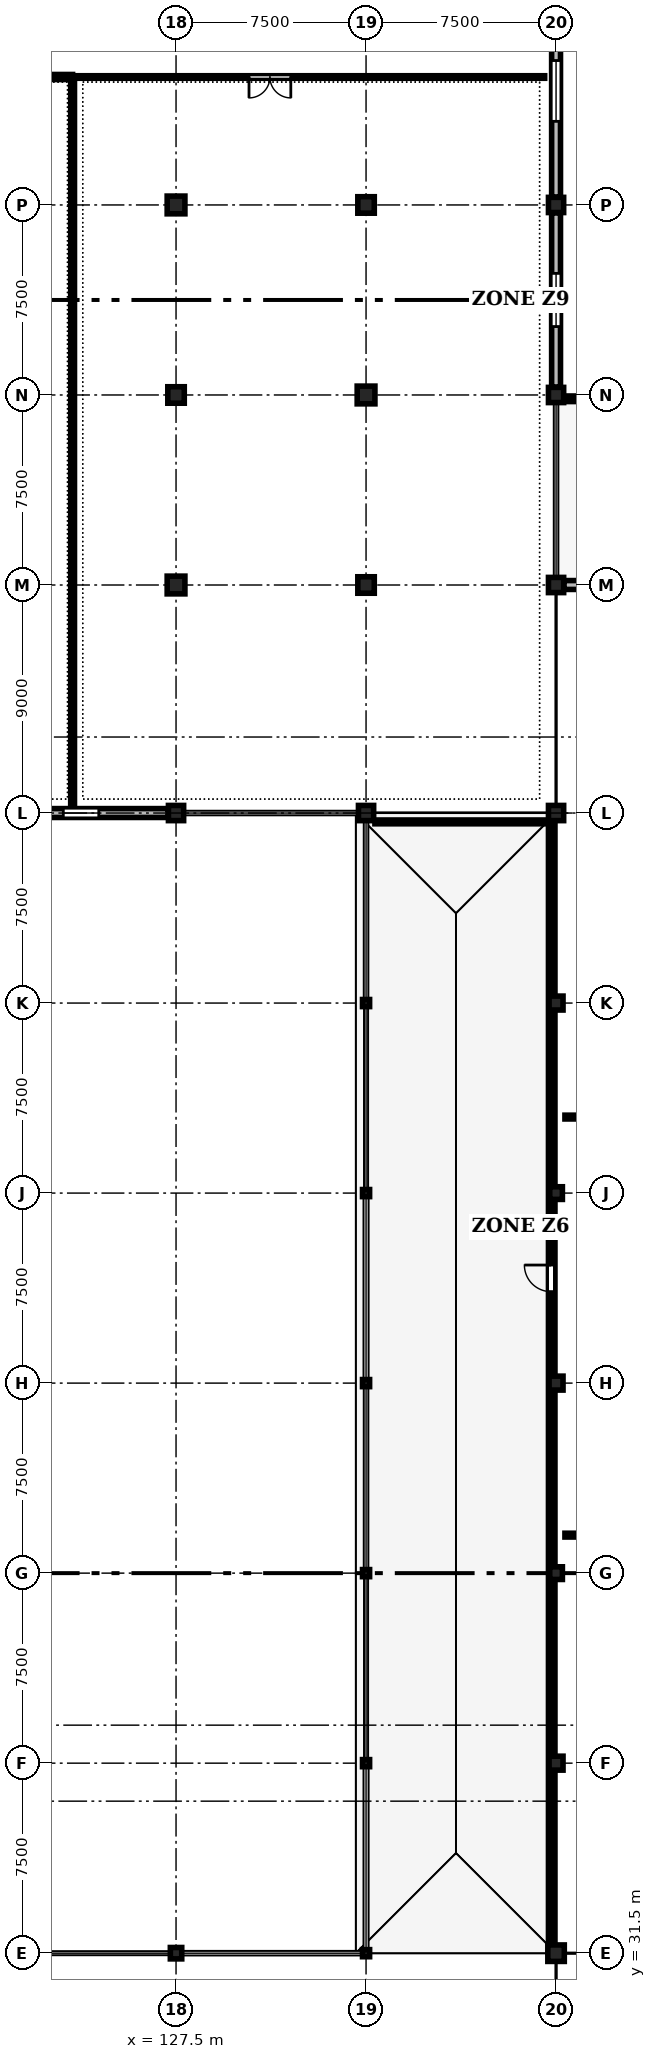
"""IFC4 building model, lengths in metres.
Left out: names, types, materials, properties, quantities, classifications, styles, units other than length and angle.
Written with IfcOpenShell. Run it as: python <this file> out.ifc"""

import sys

from ifc_helpers import new_model, si_unit, direction, frame, frame_2d, origin, origin_2d, place, context, subcontext, project, spatial, rectangle, circle, extrude, element, fill, save


model = new_model("IFC4")
c1 = context("Model", 3, precision=1e-05, world=origin(), true_north=direction((0.0, 1.0)))
c2 = subcontext(c1, "Body", "Model", "MODEL_VIEW")
j1 = project(units=[si_unit("LENGTHUNIT", "METRE"), si_unit("PLANEANGLEUNIT", "RADIAN")], contexts=[c1])
p1 = place(None, origin())
s1 = spatial("IfcSite", under=j1, at=p1, CompositionType="ELEMENT")
p2 = place(p1, origin())
s2 = spatial("IfcBuilding", under=s1, at=p2, CompositionType="ELEMENT")
p3 = place(p2, frame((0.0, 0.0, 4.8)))
s3 = spatial("IfcBuildingStorey", under=s2, at=p3, CompositionType="ELEMENT", Elevation=4.8)
p4 = place(p3, frame((127.5, 31.5, 0.0), z_axis=(0.0, 0.0, 1.0), x_axis=(1.0, 0.0, 0.0)))
e1 = element("IfcColumn", 1, at=p4, inside=s3, PredefinedType="COLUMN", context=c2, shape_type="SweptSolid", body=[
    extrude(rectangle(XDim=0.45, YDim=0.45, at=origin_2d()), origin(), (0.0, 0.0, 1.0), 4.5),
])
p5 = place(p3, frame((127.5, 76.5, 0.0), z_axis=(0.0, 0.0, 1.0), x_axis=(1.0, 0.0, 0.0)))
e2 = element("IfcColumn", 2, at=p5, inside=s3, PredefinedType="COLUMN", context=c2, shape_type="SweptSolid", body=[
    extrude(circle(Radius=0.3, at=origin_2d()), origin(), (0.0, 0.0, 1.0), 4.5),
])
p6 = place(p3, frame((127.5, 85.5, 0.0), z_axis=(0.0, 0.0, 1.0), x_axis=(1.0, 0.0, 0.0)))
e3 = element("IfcColumn", 3, at=p6, inside=s3, PredefinedType="COLUMN", context=c2, shape_type="SweptSolid", body=[
    extrude(rectangle(XDim=0.7, YDim=0.7, at=origin_2d()), origin(), (0.0, 0.0, 1.0), 4.5),
])
p7 = place(p3, frame((127.5, 93.0, 0.0), z_axis=(0.0, 0.0, 1.0), x_axis=(1.0, 0.0, 0.0)))
e4 = element("IfcColumn", 4, at=p7, inside=s3, PredefinedType="COLUMN", context=c2, shape_type="SweptSolid", body=[
    extrude(rectangle(XDim=0.65, YDim=0.65, at=origin_2d()), origin(), (0.0, 0.0, 1.0), 4.5),
])
p8 = place(p3, frame((127.5, 100.5, 0.0), z_axis=(0.0, 0.0, 1.0), x_axis=(1.0, 0.0, 0.0)))
e5 = element("IfcColumn", 5, at=p8, inside=s3, PredefinedType="COLUMN", context=c2, shape_type="SweptSolid", body=[
    extrude(rectangle(XDim=0.7, YDim=0.7, at=origin_2d()), origin(), (0.0, 0.0, 1.0), 4.5),
])
for number, where, z_axis, x_axis in (
    (6, (135.0, 31.5, 0.0), (0.0, 0.0, 1.0), (1.0, 0.0, 0.0)),
    (7, (135.0, 39.0, 0.0), (0.0, 0.0, 1.0), (1.0, 0.0, 0.0)),
    (8, (135.0, 46.5, 0.0), (0.0, 0.0, 1.0), (1.0, 0.0, 0.0)),
    (9, (135.0, 54.0, 0.0), (0.0, 0.0, 1.0), (1.0, 0.0, 0.0)),
    (10, (135.0, 61.5, 0.0), (0.0, 0.0, 1.0), (1.0, 0.0, 0.0)),
    (11, (135.0, 69.0, 0.0), (0.0, 0.0, 1.0), (1.0, 0.0, 0.0)),
):
    element("IfcColumn", number, at=place(p3, frame(where, z_axis=z_axis, x_axis=x_axis)), inside=s3, PredefinedType="COLUMN", context=c2, shape_type="SweptSolid", body=[
        extrude(rectangle(XDim=0.28, YDim=0.28, at=origin_2d()), origin(), (0.0, 0.0, 1.0), 4.5),
    ])
p9 = place(p3, frame((135.0, 76.5, 0.0), z_axis=(0.0, 0.0, 1.0), x_axis=(1.0, 0.0, 0.0)))
e12 = element("IfcColumn", 12, at=p9, inside=s3, PredefinedType="COLUMN", context=c2, shape_type="SweptSolid", body=[
    extrude(rectangle(XDim=0.6, YDim=0.6, at=origin_2d()), origin(), (0.0, 0.0, 1.0), 4.5),
])
p10 = place(p3, frame((135.0, 85.5, 0.0), z_axis=(0.0, 0.0, 1.0), x_axis=(1.0, 0.0, 0.0)))
e13 = element("IfcColumn", 13, at=p10, inside=s3, PredefinedType="COLUMN", context=c2, shape_type="SweptSolid", body=[
    extrude(rectangle(XDim=0.65, YDim=0.65, at=origin_2d()), origin(), (0.0, 0.0, 1.0), 4.5),
])
p11 = place(p3, frame((135.0, 93.0, 0.0), z_axis=(0.0, 0.0, 1.0), x_axis=(1.0, 0.0, 0.0)))
e14 = element("IfcColumn", 14, at=p11, inside=s3, PredefinedType="COLUMN", context=c2, shape_type="SweptSolid", body=[
    extrude(rectangle(XDim=0.7, YDim=0.7, at=origin_2d()), origin(), (0.0, 0.0, 1.0), 4.5),
])
for number, where, z_axis, x_axis in (
    (15, (135.0, 100.5, 0.0), (0.0, 0.0, 1.0), (1.0, 0.0, 0.0)),
    (16, (142.5, 31.5, 0.0), (0.0, 0.0, 1.0), (1.0, 0.0, 0.0)),
):
    element("IfcColumn", number, at=place(p3, frame(where, z_axis=z_axis, x_axis=x_axis)), inside=s3, PredefinedType="COLUMN", context=c2, shape_type="SweptSolid", body=[
        extrude(rectangle(XDim=0.65, YDim=0.65, at=origin_2d()), origin(), (0.0, 0.0, 1.0), 4.5),
    ])
p12 = place(p3, frame((142.5, 39.0, 0.0), z_axis=(0.0, 0.0, 1.0), x_axis=(1.0, 0.0, 0.0)))
e17 = element("IfcColumn", 17, at=p12, inside=s3, PredefinedType="COLUMN", context=c2, shape_type="SweptSolid", body=[
    extrude(rectangle(XDim=0.55, YDim=0.55, at=origin_2d()), origin(), (0.0, 0.0, 1.0), 4.5),
])
p13 = place(p3, frame((142.5, 46.5, 0.0), z_axis=(0.0, 0.0, 1.0), x_axis=(1.0, 0.0, 0.0)))
e18 = element("IfcColumn", 18, at=p13, inside=s3, PredefinedType="COLUMN", context=c2, shape_type="SweptSolid", body=[
    extrude(rectangle(XDim=0.5, YDim=0.5, at=origin_2d()), origin(), (0.0, 0.0, 1.0), 4.5),
])
p14 = place(p3, frame((142.5, 54.0, 0.0), z_axis=(0.0, 0.0, 1.0), x_axis=(1.0, 0.0, 0.0)))
e19 = element("IfcColumn", 19, at=p14, inside=s3, PredefinedType="COLUMN", context=c2, shape_type="SweptSolid", body=[
    extrude(rectangle(XDim=0.55, YDim=0.55, at=origin_2d()), origin(), (0.0, 0.0, 1.0), 4.5),
])
p15 = place(p3, frame((142.5, 61.5, 0.0), z_axis=(0.0, 0.0, 1.0), x_axis=(1.0, 0.0, 0.0)))
e20 = element("IfcColumn", 20, at=p15, inside=s3, PredefinedType="COLUMN", context=c2, shape_type="SweptSolid", body=[
    extrude(rectangle(XDim=0.5, YDim=0.5, at=origin_2d()), origin(), (0.0, 0.0, 1.0), 4.5),
])
p16 = place(p3, frame((142.5, 69.0, 0.0), z_axis=(0.0, 0.0, 1.0), x_axis=(1.0, 0.0, 0.0)))
e21 = element("IfcColumn", 21, at=p16, inside=s3, PredefinedType="COLUMN", context=c2, shape_type="SweptSolid", body=[
    extrude(rectangle(XDim=0.55, YDim=0.55, at=origin_2d()), origin(), (0.0, 0.0, 1.0), 4.5),
])
p17 = place(p3, frame((142.5, 76.5, 0.0), z_axis=(0.0, 0.0, 1.0), x_axis=(1.0, 0.0, 0.0)))
e22 = element("IfcColumn", 22, at=p17, inside=s3, PredefinedType="COLUMN", context=c2, shape_type="SweptSolid", body=[
    extrude(rectangle(XDim=0.6, YDim=0.6, at=origin_2d()), origin(), (0.0, 0.0, 1.0), 4.5),
])
p18 = place(p3, frame((142.5, 85.5, 0.0), z_axis=(0.0, 0.0, 1.0), x_axis=(1.0, 0.0, 0.0)))
e23 = element("IfcColumn", 23, at=p18, inside=s3, PredefinedType="COLUMN", context=c2, shape_type="SweptSolid", body=[
    extrude(circle(Radius=0.3, at=origin_2d()), origin(), (0.0, 0.0, 1.0), 4.5),
])
for number, where, z_axis, x_axis in (
    (24, (142.5, 93.0, 0.0), (0.0, 0.0, 1.0), (1.0, 0.0, 0.0)),
    (25, (142.5, 100.5, 0.0), (0.0, 0.0, 1.0), (1.0, 0.0, 0.0)),
):
    element("IfcColumn", number, at=place(p3, frame(where, z_axis=z_axis, x_axis=x_axis)), inside=s3, PredefinedType="COLUMN", context=c2, shape_type="SweptSolid", body=[
        extrude(rectangle(XDim=0.6, YDim=0.6, at=origin_2d()), origin(), (0.0, 0.0, 1.0), 4.5),
    ])
p19 = place(p3, frame((127.19, 76.5, 0.0), z_axis=(0.0, 0.0, 1.0), x_axis=(-1.0, 0.0, 0.0)))
e26 = element("IfcWall", 26, at=p19, inside=s3, PredefinedType="STANDARD", context=c2, shape_type="SweptSolid", body=[
    extrude(rectangle(XDim=6.88, YDim=0.35, at=frame_2d((3.44, 0.0))), origin(), (0.0, 0.0, 1.0), 3.63),
])
p20 = place(p19, frame((2.74, 0.0, 0.9)))
e27 = element("IfcOpeningElement", 27, at=p20, cuts=e26, PredefinedType="OPENING", context=c2, shape_type="SweptSolid", body=[
    extrude(rectangle(XDim=1.4, YDim=1.8, at=frame_2d((0.7, 0.9))), frame((0.0, 0.185, 0.0), z_axis=(0.0, -1.0, 0.0), x_axis=(1.0, 0.0, 0.0)), (0.0, 0.0, 1.0), 0.37),
])
p21 = place(p3, frame((142.5, 100.19, 0.0), z_axis=(0.0, 0.0, 1.0), x_axis=(0.0, -1.0, 0.0)))
e28 = element("IfcWall", 28, at=p21, inside=s3, PredefinedType="STANDARD", context=c2, shape_type="SweptSolid", body=[
    extrude(rectangle(XDim=6.88, YDim=0.35, at=frame_2d((3.44, 0.0))), origin(), (0.0, 0.0, 1.0), 3.63),
])
p22 = place(p21, frame((2.39, 0.0, 0.9)))
e29 = element("IfcOpeningElement", 29, at=p22, cuts=e28, PredefinedType="OPENING", context=c2, shape_type="SweptSolid", body=[
    extrude(rectangle(XDim=2.1, YDim=2.4, at=frame_2d((1.05, 1.2))), frame((0.0, 0.185, 0.0), z_axis=(0.0, -1.0, 0.0), x_axis=(1.0, 0.0, 0.0)), (0.0, 0.0, 1.0), 0.37),
])
p23 = place(p3, frame((142.5, 109.19, 0.0), z_axis=(0.0, 0.0, 1.0), x_axis=(0.0, -1.0, 0.0)))
e30 = element("IfcWall", 30, at=p23, inside=s3, PredefinedType="STANDARD", context=c2, shape_type="SweptSolid", body=[
    extrude(rectangle(XDim=8.38, YDim=0.35, at=frame_2d((4.19, 0.0))), origin(), (0.0, 0.0, 1.0), 3.63),
])
p24 = place(p23, frame((2.99, 0.0, 0.9)))
e31 = element("IfcOpeningElement", 31, at=p24, cuts=e30, PredefinedType="OPENING", context=c2, shape_type="SweptSolid", body=[
    extrude(rectangle(XDim=2.4, YDim=2.45, at=frame_2d((1.2, 1.225))), frame((0.0, 0.185, 0.0), z_axis=(0.0, -1.0, 0.0), x_axis=(1.0, 0.0, 0.0)), (0.0, 0.0, 1.0), 0.37),
])
p25 = place(p3, frame((142.81, 85.5, 0.0), z_axis=(0.0, 0.0, 1.0), x_axis=(1.0, 0.0, 0.0)))
e32 = element("IfcWall", 32, at=p25, inside=s3, PredefinedType="STANDARD", context=c2, shape_type="SweptSolid", body=[
    extrude(rectangle(XDim=6.93, YDim=0.35, at=frame_2d((3.465, 0.0))), origin(), (0.0, 0.0, 1.0), 3.63),
])
p26 = place(p25, frame((2.715, 0.0, 0.9)))
e33 = element("IfcOpeningElement", 33, at=p26, cuts=e32, PredefinedType="OPENING", context=c2, shape_type="SweptSolid", body=[
    extrude(rectangle(XDim=1.5, YDim=2.4, at=frame_2d((0.75, 1.2))), frame((0.0, 0.185, 0.0), z_axis=(0.0, -1.0, 0.0), x_axis=(1.0, 0.0, 0.0)), (0.0, 0.0, 1.0), 0.37),
])
p27 = place(p3, frame((142.65, 92.85, 0.08), z_axis=(0.0, 0.0, 1.0), x_axis=(1.0, 0.0, 0.0)))
e34 = element("IfcWall", 34, at=p27, inside=s3, PredefinedType="PARAPET", context=c2, shape_type="SweptSolid", body=[
    extrude(rectangle(XDim=29.7, YDim=0.22, at=frame_2d((14.85, 0.0))), origin(), (0.0, 0.0, 1.0), 0.28),
])
p28 = place(p3, frame((142.3, 31.5, 0.0), z_axis=(0.0, 0.0, 1.0), x_axis=(0.0, 1.0, 0.0)))
e35 = element("IfcWall", 35, at=p28, inside=s3, PredefinedType="STANDARD", context=c2, shape_type="SweptSolid", body=[
    extrude(rectangle(XDim=44.65, YDim=0.2, at=frame_2d((22.325, 0.0))), origin(), (0.0, 0.0, 1.0), 3.615),
])
p29 = place(p28, frame((26.11, 0.0, 0.0)))
e36 = element("IfcOpeningElement", 36, at=p29, cuts=e35, PredefinedType="OPENING", context=c2, shape_type="SweptSolid", body=[
    extrude(rectangle(XDim=1.05, YDim=2.2, at=frame_2d((0.525, 1.1))), frame((0.0, 0.11, 0.0), z_axis=(0.0, -1.0, 0.0), x_axis=(1.0, 0.0, 0.0)), (0.0, 0.0, 1.0), 0.22),
])
p30 = place(p3, frame((123.417, 105.55, 0.0), z_axis=(0.0, 0.0, 1.0), x_axis=(-1.0, 0.0, 0.0)))
e37 = element("IfcWall", 37, at=p30, inside=s3, PredefinedType="STANDARD", context=c2, shape_type="SweptSolid", body=[
    extrude(rectangle(XDim=18.433, YDim=0.2, at=frame_2d((9.217, 0.0))), origin(), (0.0, 0.0, 1.0), 4.165),
])
p31 = place(p30, frame((6.763, 0.0, 0.0)))
e38 = element("IfcOpeningElement", 38, at=p31, cuts=e37, PredefinedType="OPENING", context=c2, shape_type="SweptSolid", body=[
    extrude(rectangle(XDim=1.65, YDim=2.35, at=frame_2d((0.825, 1.175))), frame((0.0, 0.11, 0.0), z_axis=(0.0, -1.0, 0.0), x_axis=(1.0, 0.0, 0.0)), (0.0, 0.0, 1.0), 0.22),
])
p32 = place(p3, frame((142.05, 105.55, 0.0), z_axis=(0.0, 0.0, 1.0), x_axis=(-1.0, 0.0, 0.0)))
e39 = element("IfcWall", 39, at=p32, inside=s3, PredefinedType="PARTITIONING", context=c2, shape_type="SweptSolid", body=[
    extrude(rectangle(XDim=18.433, YDim=0.1, at=frame_2d((9.217, 0.0))), origin(), (0.0, 0.0, 1.0), 4.165),
])
p33 = place(p32, frame((10.02, 0.0, 0.0)))
e40 = element("IfcOpeningElement", 40, at=p33, cuts=e39, PredefinedType="OPENING", context=c2, shape_type="SweptSolid", body=[
    extrude(rectangle(XDim=1.65, YDim=2.35, at=frame_2d((0.825, 1.175))), frame((0.0, 0.06, 0.0), z_axis=(0.0, -1.0, 0.0), x_axis=(1.0, 0.0, 0.0)), (0.0, 0.0, 1.0), 0.12),
])
p34 = place(p3, frame((135.35, 76.15, 0.0), z_axis=(0.0, 0.0, 1.0), x_axis=(1.0, 0.0, 0.0)))
e41 = element("IfcWall", 41, at=p34, inside=s3, PredefinedType="PARTITIONING", context=c2, shape_type="SweptSolid", body=[
    extrude(rectangle(XDim=6.95, YDim=0.15, at=frame_2d((3.475, 0.0))), origin(), (0.0, 0.0, 1.0), 3.615),
])
for number, where, z_axis, x_axis in (
    (42, (142.85, 48.0, 0.0), (0.0, 0.0, 1.0), (1.0, 0.0, 0.0)),
    (43, (142.85, 64.5, 0.0), (0.0, 0.0, 1.0), (1.0, 0.0, 0.0)),
):
    element("IfcWall", number, at=place(p3, frame(where, z_axis=z_axis, x_axis=x_axis)), inside=s3, PredefinedType="PARTITIONING", context=c2, shape_type="SweptSolid", body=[
        extrude(rectangle(XDim=11.1, YDim=0.15, at=frame_2d((5.55, 0.0))), origin(), (0.0, 0.0, 1.0), 4.165),
    ])
p35 = place(p3, frame((123.417, 76.85, 0.0), z_axis=(0.0, 0.0, 1.0), x_axis=(0.0, 1.0, 0.0)))
e44 = element("IfcWall", 44, at=p35, inside=s3, PredefinedType="PARTITIONING", context=c2, shape_type="SweptSolid", body=[
    extrude(rectangle(XDim=28.7, YDim=0.15, at=frame_2d((14.35, 0.0))), origin(), (0.0, 0.0, 1.0), 3.765),
])
p36 = place(p20, origin())
e45 = element("IfcWindow", 45, at=p36, inside=s3, PartitioningType="SINGLE_PANEL", PredefinedType="WINDOW", context=c2, shape_type="SweptSolid", body=[
    extrude(rectangle(XDim=1.4, YDim=1.8, at=frame_2d((0.7, 0.9))), frame((0.0, 0.03, 0.0), z_axis=(0.0, -1.0, 0.0), x_axis=(1.0, 0.0, 0.0)), (0.0, 0.0, 1.0), 0.06),
])
fill(e27, e45)
p37 = place(p22, origin())
e46 = element("IfcWindow", 46, at=p37, inside=s3, PartitioningType="SINGLE_PANEL", PredefinedType="WINDOW", context=c2, shape_type="SweptSolid", body=[
    extrude(rectangle(XDim=2.1, YDim=2.4, at=frame_2d((1.05, 1.2))), frame((0.0, 0.03, 0.0), z_axis=(0.0, -1.0, 0.0), x_axis=(1.0, 0.0, 0.0)), (0.0, 0.0, 1.0), 0.06),
])
fill(e29, e46)
p38 = place(p24, origin())
e47 = element("IfcWindow", 47, at=p38, inside=s3, PartitioningType="SINGLE_PANEL", PredefinedType="WINDOW", context=c2, shape_type="SweptSolid", body=[
    extrude(rectangle(XDim=2.4, YDim=2.45, at=frame_2d((1.2, 1.225))), frame((0.0, 0.03, 0.0), z_axis=(0.0, -1.0, 0.0), x_axis=(1.0, 0.0, 0.0)), (0.0, 0.0, 1.0), 0.06),
])
fill(e31, e47)
p39 = place(p29, origin())
e48 = element("IfcDoor", 48, at=p39, inside=s3, OperationType="SINGLE_SWING_RIGHT", PredefinedType="DOOR", context=c2, shape_type="SweptSolid", body=[
    extrude(rectangle(XDim=1.05, YDim=2.2, at=frame_2d((0.525, 1.1))), frame((0.0, 0.025, 0.0), z_axis=(0.0, -1.0, 0.0), x_axis=(1.0, 0.0, 0.0)), (0.0, 0.0, 1.0), 0.05),
])
fill(e36, e48)
p40 = place(p33, origin())
e49 = element("IfcDoor", 49, at=p40, inside=s3, OperationType="DOUBLE_DOOR_SINGLE_SWING", PredefinedType="DOOR", context=c2, shape_type="SweptSolid", body=[
    extrude(rectangle(XDim=1.65, YDim=2.35, at=frame_2d((0.825, 1.175))), frame((0.0, 0.025, 0.0), z_axis=(0.0, -1.0, 0.0), x_axis=(1.0, 0.0, 0.0)), (0.0, 0.0, 1.0), 0.05),
])
fill(e40, e49)
save(model, sys.argv[1])
